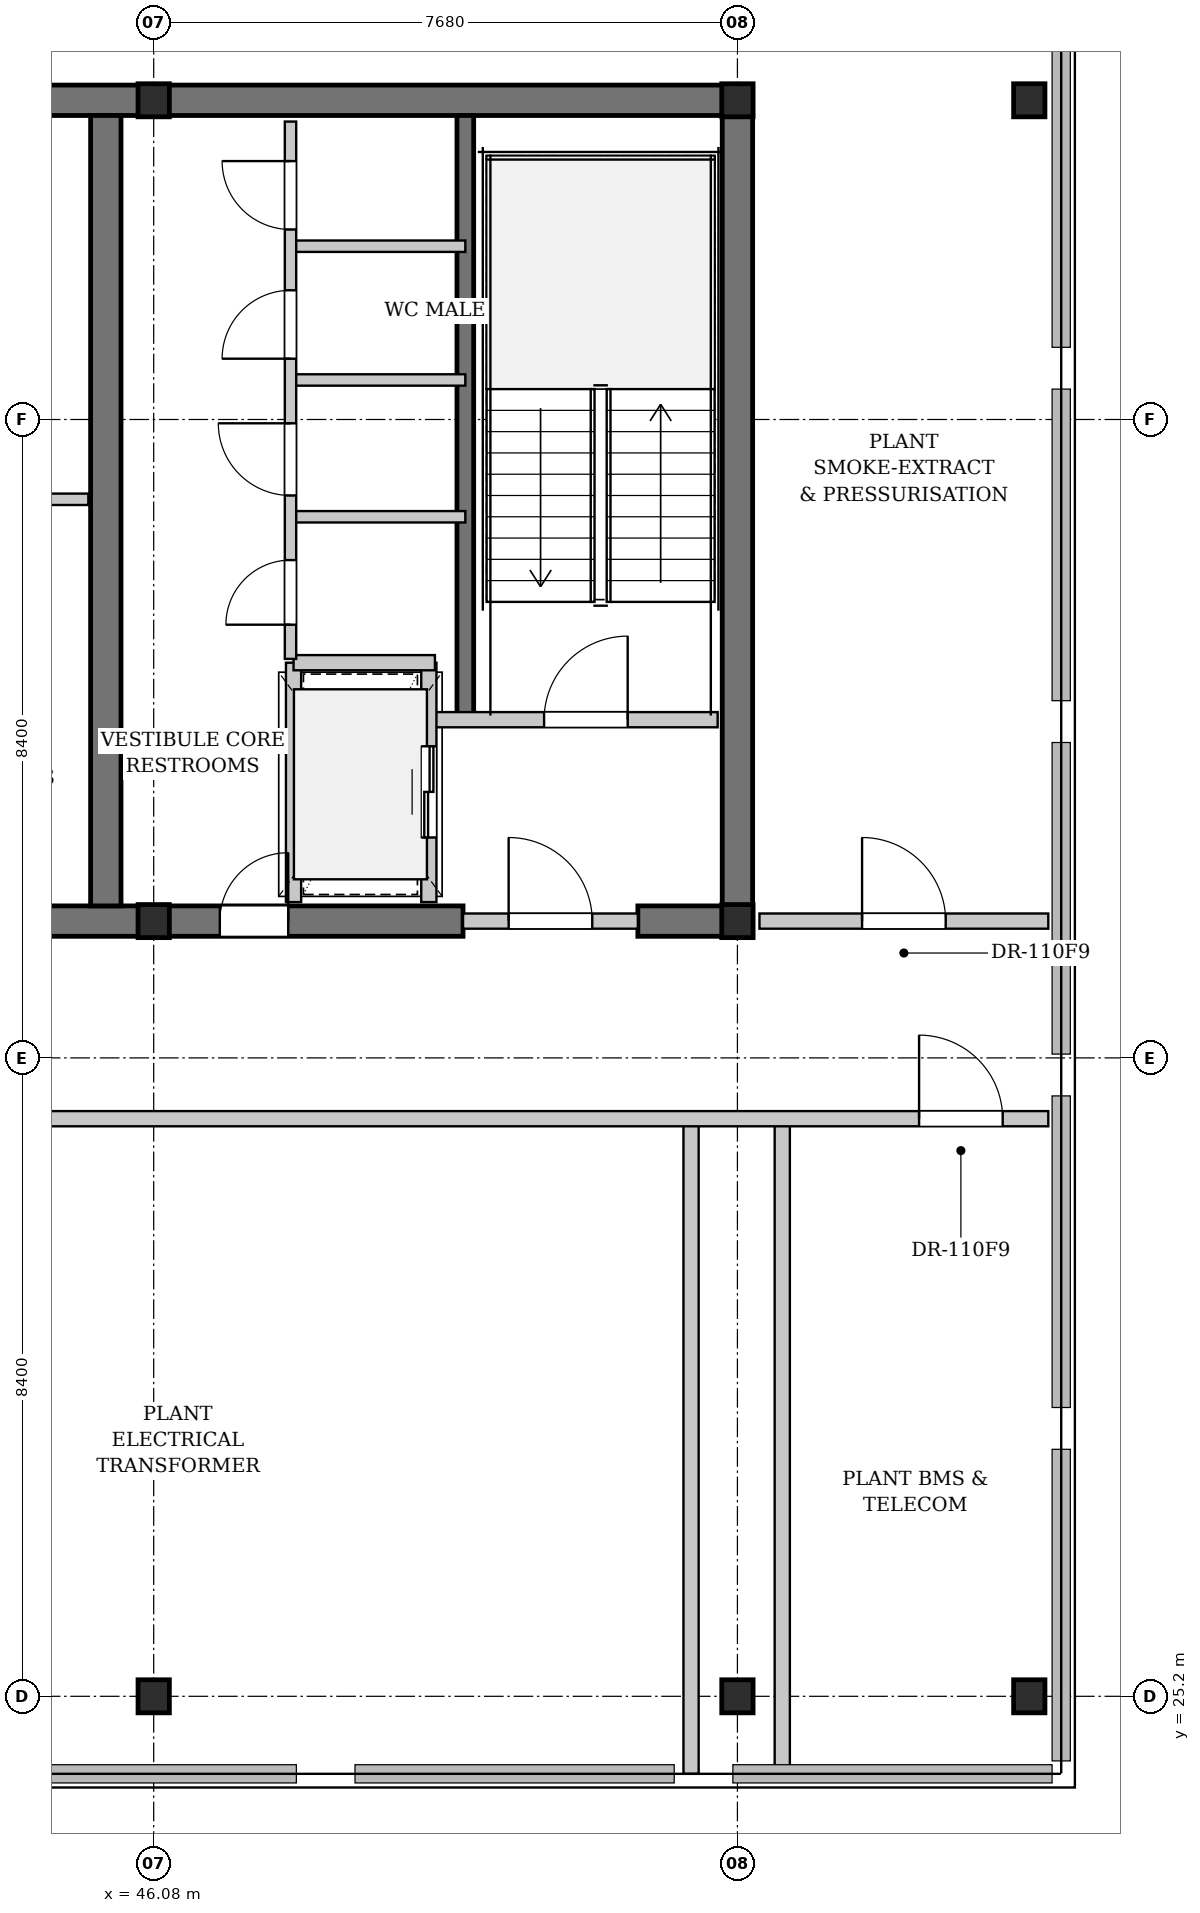
"""IFC4 building model, lengths in metres.
Left out: names, types, materials, properties, quantities, classifications, styles, units other than length and angle.
Written with IfcOpenShell. Run it as: python <this file> out.ifc"""

import sys

from ifc_helpers import new_model, si_unit, direction, frame, frame_2d, origin, origin_2d, place, context, subcontext, project, spatial, rectangle, i_section, extrude, element, fill, save


model = new_model("IFC4")
c1 = context("Model", 3, precision=1e-05, world=origin(), true_north=direction((0.0, 1.0)))
c2 = subcontext(c1, "Body", "Model", "MODEL_VIEW")
j1 = project(units=[si_unit("LENGTHUNIT", "METRE"), si_unit("PLANEANGLEUNIT", "RADIAN")], contexts=[c1])
p1 = place(None, origin())
s1 = spatial("IfcSite", under=j1, at=p1, CompositionType="ELEMENT")
p2 = place(p1, origin())
s2 = spatial("IfcBuilding", under=s1, at=p2, CompositionType="ELEMENT")
p3 = place(p2, frame((0.0, 0.0, 251.3)))
s3 = spatial("IfcBuildingStorey", under=s2, at=p3, CompositionType="ELEMENT", Elevation=251.3)
p4 = place(p3, frame((22.84, 46.2, 0.0), z_axis=(0.0, 0.0, 1.0), x_axis=(1.0, 0.0, 0.0)))
e1 = element("IfcWall", 1, at=p4, inside=s3, PredefinedType="SHEAR", context=c2, shape_type="SweptSolid", body=[
    extrude(rectangle(XDim=31.12, YDim=0.4, at=frame_2d((15.56, 0.0))), origin(), (0.0, 0.0, 1.0), 3.48),
])
p5 = place(p3, frame((42.1, 35.4, 0.0), z_axis=(0.0, 0.0, 1.0), x_axis=(1.0, 0.0, 0.0)))
e2 = element("IfcWall", 2, at=p5, inside=s3, PredefinedType="SHEAR", context=c2, shape_type="SweptSolid", body=[
    extrude(rectangle(XDim=8.05, YDim=0.4, at=frame_2d((4.025, 0.0))), origin(), (0.0, 0.0, 1.0), 3.48),
])
p6 = place(p5, frame((4.85, 0.0, 0.0)))
e3 = element("IfcOpeningElement", 3, at=p6, cuts=e2, PredefinedType="OPENING", context=c2, shape_type="SweptSolid", body=[
    extrude(rectangle(XDim=0.9, YDim=2.15, at=frame_2d((0.45, 1.075))), frame((0.0, 0.21, 0.0), z_axis=(0.0, -1.0, 0.0), x_axis=(1.0, 0.0, 0.0)), (0.0, 0.0, 1.0), 0.42),
])
p7 = place(p3, frame((52.45, 35.4, 0.0), z_axis=(0.0, 0.0, 1.0), x_axis=(1.0, 0.0, 0.0)))
e4 = element("IfcWall", 4, at=p7, inside=s3, PredefinedType="SHEAR", context=c2, shape_type="SweptSolid", body=[
    extrude(rectangle(XDim=1.51, YDim=0.4, at=frame_2d((0.755, 0.0))), origin(), (0.0, 0.0, 1.0), 3.48),
])
for number, where, z_axis, x_axis in (
    (5, (45.45, 35.6, 0.0), (0.0, 0.0, 1.0), (0.0, 1.0, 0.0)),
    (6, (53.76, 35.6, 0.0), (0.0, 0.0, 1.0), (0.0, 1.0, 0.0)),
):
    element("IfcWall", number, at=place(p3, frame(where, z_axis=z_axis, x_axis=x_axis)), inside=s3, PredefinedType="SHEAR", context=c2, shape_type="SweptSolid", body=[
        extrude(rectangle(XDim=10.4, YDim=0.4, at=frame_2d((5.2, 0.0))), origin(), (0.0, 0.0, 1.0), 3.48),
    ])
p8 = place(p3, frame((50.18, 38.05, 0.0), z_axis=(0.0, 0.0, 1.0), x_axis=(0.0, 1.0, 0.0)))
e7 = element("IfcWall", 7, at=p8, inside=s3, PredefinedType="SHEAR", context=c2, shape_type="SweptSolid", body=[
    extrude(rectangle(XDim=7.95, YDim=0.22, at=frame_2d((3.975, 0.0))), origin(), (0.0, 0.0, 1.0), 3.48),
])
for number, where, z_axis, x_axis in (
    (8, (46.08, 35.4, 0.0), (0.0, 0.0, 1.0), (1.0, 0.0, 0.0)),
    (9, (46.08, 46.2, 0.0), (0.0, 0.0, 1.0), (1.0, 0.0, 0.0)),
    (10, (46.08, 25.2, 0.0), (0.0, 0.0, 1.0), (1.0, 0.0, 0.0)),
    (11, (53.76, 35.4, 0.0), (0.0, 0.0, 1.0), (1.0, 0.0, 0.0)),
    (12, (53.76, 46.2, 0.0), (0.0, 0.0, 1.0), (1.0, 0.0, 0.0)),
    (13, (53.76, 25.2, 0.0), (0.0, 0.0, 1.0), (1.0, 0.0, 0.0)),
    (14, (57.6, 25.2, 0.0), (0.0, 0.0, 1.0), (1.0, 0.0, 0.0)),
    (15, (57.6, 46.2, 0.0), (0.0, 0.0, 1.0), (1.0, 0.0, 0.0)),
):
    element("IfcColumn", number, at=place(p3, frame(where, z_axis=z_axis, x_axis=x_axis)), inside=s3, PredefinedType="COLUMN", context=c2, shape_type="SweptSolid", body=[
        extrude(i_section(OverallWidth=0.412, OverallDepth=0.435, WebThickness=0.036, FlangeThickness=0.058, FilletRadius=0.015, at=origin_2d()), origin(), (0.0, 0.0, 1.0), 3.9),
    ])
p9 = place(p3, frame((41.85, 40.95, 0.0), z_axis=(0.0, 0.0, 1.0), x_axis=(1.0, 0.0, 0.0)))
e16 = element("IfcWall", 16, at=p9, inside=s3, PredefinedType="PARTITIONING", context=c2, shape_type="SweptSolid", body=[
    extrude(rectangle(XDim=3.37, YDim=0.15, at=frame_2d((1.685, 0.0))), origin(), (0.0, 0.0, 1.0), 3.48),
])
p10 = place(p3, frame((49.78, 38.05, 0.0), z_axis=(0.0, 0.0, 1.0), x_axis=(1.0, 0.0, 0.0)))
e17 = element("IfcWall", 17, at=p10, inside=s3, PredefinedType="PARTITIONING", context=c2, shape_type="SweptSolid", body=[
    extrude(rectangle(XDim=3.72, YDim=0.2, at=frame_2d((1.86, 0.0))), origin(), (0.0, 0.0, 1.0), 3.48),
])
p11 = place(p10, frame((1.436, 0.0, 0.0)))
e18 = element("IfcOpeningElement", 18, at=p11, cuts=e17, PredefinedType="OPENING", context=c2, shape_type="SweptSolid", body=[
    extrude(rectangle(XDim=1.1, YDim=2.15, at=frame_2d((0.55, 1.075))), frame((0.0, 0.11, 0.0), z_axis=(0.0, -1.0, 0.0), x_axis=(1.0, 0.0, 0.0)), (0.0, 0.0, 1.0), 0.22),
])
p12 = place(p3, frame((50.15, 35.4, 0.0), z_axis=(0.0, 0.0, 1.0), x_axis=(1.0, 0.0, 0.0)))
e19 = element("IfcWall", 19, at=p12, inside=s3, PredefinedType="PARTITIONING", context=c2, shape_type="SweptSolid", body=[
    extrude(rectangle(XDim=2.3, YDim=0.2, at=frame_2d((1.15, 0.0))), origin(), (0.0, 0.0, 1.0), 2.661),
])
p13 = place(p12, frame((0.6, 0.0, 0.0)))
e20 = element("IfcOpeningElement", 20, at=p13, cuts=e19, PredefinedType="OPENING", context=c2, shape_type="SweptSolid", body=[
    extrude(rectangle(XDim=1.1, YDim=2.15, at=frame_2d((0.55, 1.075))), frame((0.0, 0.11, 0.0), z_axis=(0.0, -1.0, 0.0), x_axis=(1.0, 0.0, 0.0)), (0.0, 0.0, 1.0), 0.22),
])
p14 = place(p3, frame((49.7, 35.65, 0.0), z_axis=(0.0, 0.0, 1.0), x_axis=(0.0, 1.0, 0.0)))
e21 = element("IfcWall", 21, at=p14, inside=s3, PredefinedType="PARTITIONING", context=c2, shape_type="SweptSolid", body=[
    extrude(rectangle(XDim=3.15, YDim=0.2, at=frame_2d((1.575, 0.0))), origin(), (0.0, 0.0, 1.0), 3.48),
])
p15 = place(p14, frame((0.85, 0.0, 0.0)))
e22 = element("IfcOpeningElement", 22, at=p15, cuts=e21, PredefinedType="OPENING", context=c2, shape_type="SweptSolid", body=[
    extrude(rectangle(XDim=1.2, YDim=2.2, at=frame_2d((0.6, 1.1))), frame((0.0, 0.11, 0.0), z_axis=(0.0, -1.0, 0.0), x_axis=(1.0, 0.0, 0.0)), (0.0, 0.0, 1.0), 0.22),
])
p16 = place(p3, frame((47.92, 35.65, 0.0), z_axis=(0.0, 0.0, 1.0), x_axis=(0.0, 1.0, 0.0)))
e23 = element("IfcWall", 23, at=p16, inside=s3, PredefinedType="PARTITIONING", context=c2, shape_type="SweptSolid", body=[
    extrude(rectangle(XDim=3.15, YDim=0.2, at=frame_2d((1.575, 0.0))), origin(), (0.0, 0.0, 1.0), 3.48),
])
p17 = place(p3, frame((47.92, 38.8, 0.0), z_axis=(0.0, 0.0, 1.0), x_axis=(1.0, 0.0, 0.0)))
e24 = element("IfcWall", 24, at=p17, inside=s3, PredefinedType="PARTITIONING", context=c2, shape_type="SweptSolid", body=[
    extrude(rectangle(XDim=1.86, YDim=0.2, at=frame_2d((0.93, 0.0))), origin(), (0.0, 0.0, 1.0), 3.48),
])
for number, where, z_axis, x_axis in (
    (25, (47.88, 40.72, 0.0), (0.0, 0.0, 1.0), (1.0, 0.0, 0.0)),
    (26, (47.88, 42.52, 0.0), (0.0, 0.0, 1.0), (1.0, 0.0, 0.0)),
    (27, (47.88, 44.28, 0.0), (0.0, 0.0, 1.0), (1.0, 0.0, 0.0)),
):
    element("IfcWall", number, at=place(p3, frame(where, z_axis=z_axis, x_axis=x_axis)), inside=s3, PredefinedType="PARTITIONING", context=c2, shape_type="SweptSolid", body=[
        extrude(rectangle(XDim=2.3, YDim=0.15, at=frame_2d((1.15, 0.0))), origin(), (0.0, 0.0, 1.0), 3.48),
    ])
p18 = place(p3, frame((47.88, 38.85, 0.0), z_axis=(0.0, 0.0, 1.0), x_axis=(0.0, 1.0, 0.0)))
e28 = element("IfcWall", 28, at=p18, inside=s3, PredefinedType="PARTITIONING", context=c2, shape_type="SweptSolid", body=[
    extrude(rectangle(XDim=7.07, YDim=0.15, at=frame_2d((3.535, 0.0))), origin(), (0.0, 0.0, 1.0), 3.48),
])
p19 = place(p18, frame((0.45, 0.0, 0.0)))
e29 = element("IfcOpeningElement", 29, at=p19, cuts=e28, PredefinedType="OPENING", context=c2, shape_type="SweptSolid", body=[
    extrude(rectangle(XDim=0.85, YDim=2.15, at=frame_2d((0.425, 1.075))), frame((0.0, 0.085, 0.0), z_axis=(0.0, -1.0, 0.0), x_axis=(1.0, 0.0, 0.0)), (0.0, 0.0, 1.0), 0.17),
])
p20 = place(p18, frame((2.15, 0.0, 0.0)))
e30 = element("IfcOpeningElement", 30, at=p20, cuts=e28, PredefinedType="OPENING", context=c2, shape_type="SweptSolid", body=[
    extrude(rectangle(XDim=0.95, YDim=2.15, at=frame_2d((0.475, 1.075))), frame((0.0, 0.085, 0.0), z_axis=(0.0, -1.0, 0.0), x_axis=(1.0, 0.0, 0.0)), (0.0, 0.0, 1.0), 0.17),
])
p21 = place(p18, frame((3.95, 0.0, 0.0)))
e31 = element("IfcOpeningElement", 31, at=p21, cuts=e28, PredefinedType="OPENING", context=c2, shape_type="SweptSolid", body=[
    extrude(rectangle(XDim=0.9, YDim=2.15, at=frame_2d((0.45, 1.075))), frame((0.0, 0.085, 0.0), z_axis=(0.0, -1.0, 0.0), x_axis=(1.0, 0.0, 0.0)), (0.0, 0.0, 1.0), 0.17),
])
p22 = place(p18, frame((5.65, 0.0, 0.0)))
e32 = element("IfcOpeningElement", 32, at=p22, cuts=e28, PredefinedType="OPENING", context=c2, shape_type="SweptSolid", body=[
    extrude(rectangle(XDim=0.9, YDim=2.15, at=frame_2d((0.45, 1.075))), frame((0.0, 0.085, 0.0), z_axis=(0.0, -1.0, 0.0), x_axis=(1.0, 0.0, 0.0)), (0.0, 0.0, 1.0), 0.17),
])
p23 = place(p3, frame((54.05, 35.4, 0.0), z_axis=(0.0, 0.0, 1.0), x_axis=(1.0, 0.0, 0.0)))
e33 = element("IfcWall", 33, at=p23, inside=s3, PredefinedType="PARTITIONING", context=c2, shape_type="SweptSolid", body=[
    extrude(rectangle(XDim=3.8, YDim=0.2, at=frame_2d((1.9, 0.0))), origin(), (0.0, 0.0, 1.0), 3.48),
])
p24 = place(p23, frame((1.35, 0.0, 0.0)))
e34 = element("IfcOpeningElement", 34, at=p24, cuts=e33, PredefinedType="OPENING", context=c2, shape_type="SweptSolid", body=[
    extrude(rectangle(XDim=1.1, YDim=2.15, at=frame_2d((0.55, 1.075))), frame((0.0, 0.11, 0.0), z_axis=(0.0, -1.0, 0.0), x_axis=(1.0, 0.0, 0.0)), (0.0, 0.0, 1.0), 0.22),
])
for number, where, z_axis, x_axis in (
    (35, (53.15, 24.18, 0.0), (0.0, 0.0, 1.0), (0.0, 1.0, 0.0)),
    (36, (54.35, 24.18, 0.0), (0.0, 0.0, 1.0), (0.0, 1.0, 0.0)),
):
    element("IfcWall", number, at=place(p3, frame(where, z_axis=z_axis, x_axis=x_axis)), inside=s3, PredefinedType="PARTITIONING", context=c2, shape_type="SweptSolid", body=[
        extrude(rectangle(XDim=8.62, YDim=0.2, at=frame_2d((4.31, 0.0))), origin(), (0.0, 0.0, 1.0), 3.48),
    ])
p25 = place(p3, frame((18.95, 32.8, 0.0), z_axis=(0.0, 0.0, 1.0), x_axis=(1.0, 0.0, 0.0)))
e37 = element("IfcWall", 37, at=p25, inside=s3, PredefinedType="PARTITIONING", context=c2, shape_type="SweptSolid", body=[
    extrude(rectangle(XDim=38.9, YDim=0.2, at=frame_2d((19.45, 0.0))), origin(), (0.0, 0.0, 1.0), 3.48),
])
p26 = place(p25, frame((0.6, 0.0, 0.0)))
e38 = element("IfcOpeningElement", 38, at=p26, cuts=e37, PredefinedType="OPENING", context=c2, shape_type="SweptSolid", body=[
    extrude(rectangle(XDim=1.1, YDim=2.15, at=frame_2d((0.55, 1.075))), frame((0.0, 0.11, 0.0), z_axis=(0.0, -1.0, 0.0), x_axis=(1.0, 0.0, 0.0)), (0.0, 0.0, 1.0), 0.22),
])
p27 = place(p25, frame((7.355, 0.0, 0.0)))
e39 = element("IfcOpeningElement", 39, at=p27, cuts=e37, PredefinedType="OPENING", context=c2, shape_type="SweptSolid", body=[
    extrude(rectangle(XDim=1.1, YDim=2.15, at=frame_2d((0.55, 1.075))), frame((0.0, 0.11, 0.0), z_axis=(0.0, -1.0, 0.0), x_axis=(1.0, 0.0, 0.0)), (0.0, 0.0, 1.0), 0.22),
])
p28 = place(p25, frame((22.761, 0.0, 0.0)))
e40 = element("IfcOpeningElement", 40, at=p28, cuts=e37, PredefinedType="OPENING", context=c2, shape_type="SweptSolid", body=[
    extrude(rectangle(XDim=1.1, YDim=2.15, at=frame_2d((0.55, 1.075))), frame((0.0, 0.11, 0.0), z_axis=(0.0, -1.0, 0.0), x_axis=(1.0, 0.0, 0.0)), (0.0, 0.0, 1.0), 0.22),
])
p29 = place(p25, frame((37.2, 0.0, 0.0)))
e41 = element("IfcOpeningElement", 41, at=p29, cuts=e37, PredefinedType="OPENING", context=c2, shape_type="SweptSolid", body=[
    extrude(rectangle(XDim=1.1, YDim=2.15, at=frame_2d((0.55, 1.075))), frame((0.0, 0.11, 0.0), z_axis=(0.0, -1.0, 0.0), x_axis=(1.0, 0.0, 0.0)), (0.0, 0.0, 1.0), 0.22),
])
p30 = place(p11, origin())
e42 = element("IfcDoor", 42, at=p30, inside=s3, OperationType="SINGLE_SWING_RIGHT", PredefinedType="DOOR", context=c2, shape_type="SweptSolid", body=[
    extrude(rectangle(XDim=1.1, YDim=2.15, at=frame_2d((0.55, 1.075))), frame((0.0, 0.025, 0.0), z_axis=(0.0, -1.0, 0.0), x_axis=(1.0, 0.0, 0.0)), (0.0, 0.0, 1.0), 0.05),
])
fill(e18, e42)
p31 = place(p13, origin())
e43 = element("IfcDoor", 43, at=p31, inside=s3, OperationType="SINGLE_SWING_LEFT", PredefinedType="DOOR", context=c2, shape_type="SweptSolid", body=[
    extrude(rectangle(XDim=1.1, YDim=2.15, at=frame_2d((0.55, 1.075))), frame((0.0, 0.025, 0.0), z_axis=(0.0, -1.0, 0.0), x_axis=(1.0, 0.0, 0.0)), (0.0, 0.0, 1.0), 0.05),
])
fill(e20, e43)
p32 = place(p15, origin())
e44 = element("IfcDoor", 44, at=p32, inside=s3, OperationType="DOUBLE_DOOR_SLIDING", PredefinedType="DOOR", context=c2, shape_type="SweptSolid", body=[
    extrude(rectangle(XDim=1.2, YDim=2.2, at=frame_2d((0.6, 1.1))), frame((0.0, 0.025, 0.0), z_axis=(0.0, -1.0, 0.0), x_axis=(1.0, 0.0, 0.0)), (0.0, 0.0, 1.0), 0.05),
])
fill(e22, e44)
p33 = place(p19, origin())
e45 = element("IfcDoor", 45, at=p33, inside=s3, OperationType="SINGLE_SWING_LEFT", PredefinedType="DOOR", context=c2, shape_type="SweptSolid", body=[
    extrude(rectangle(XDim=0.85, YDim=2.15, at=frame_2d((0.425, 1.075))), frame((0.0, 0.025, 0.0), z_axis=(0.0, -1.0, 0.0), x_axis=(1.0, 0.0, 0.0)), (0.0, 0.0, 1.0), 0.05),
])
fill(e29, e45)
p34 = place(p20, origin())
e46 = element("IfcDoor", 46, at=p34, inside=s3, OperationType="SINGLE_SWING_RIGHT", PredefinedType="DOOR", context=c2, shape_type="SweptSolid", body=[
    extrude(rectangle(XDim=0.95, YDim=2.15, at=frame_2d((0.475, 1.075))), frame((0.0, 0.025, 0.0), z_axis=(0.0, -1.0, 0.0), x_axis=(1.0, 0.0, 0.0)), (0.0, 0.0, 1.0), 0.05),
])
fill(e30, e46)
p35 = place(p21, origin())
e47 = element("IfcDoor", 47, at=p35, inside=s3, OperationType="SINGLE_SWING_LEFT", PredefinedType="DOOR", context=c2, shape_type="SweptSolid", body=[
    extrude(rectangle(XDim=0.9, YDim=2.15, at=frame_2d((0.45, 1.075))), frame((0.0, 0.025, 0.0), z_axis=(0.0, -1.0, 0.0), x_axis=(1.0, 0.0, 0.0)), (0.0, 0.0, 1.0), 0.05),
])
fill(e31, e47)
p36 = place(p22, origin())
e48 = element("IfcDoor", 48, at=p36, inside=s3, OperationType="SINGLE_SWING_RIGHT", PredefinedType="DOOR", context=c2, shape_type="SweptSolid", body=[
    extrude(rectangle(XDim=0.9, YDim=2.15, at=frame_2d((0.45, 1.075))), frame((0.0, 0.025, 0.0), z_axis=(0.0, -1.0, 0.0), x_axis=(1.0, 0.0, 0.0)), (0.0, 0.0, 1.0), 0.05),
])
fill(e32, e48)
p37 = place(p24, origin())
e49 = element("IfcDoor", 49, at=p37, inside=s3, OperationType="SINGLE_SWING_LEFT", PredefinedType="DOOR", context=c2, shape_type="SweptSolid", body=[
    extrude(rectangle(XDim=1.1, YDim=2.15, at=frame_2d((0.55, 1.075))), frame((0.0, 0.025, 0.0), z_axis=(0.0, -1.0, 0.0), x_axis=(1.0, 0.0, 0.0)), (0.0, 0.0, 1.0), 0.05),
])
fill(e34, e49)
p38 = place(p29, origin())
e50 = element("IfcDoor", 50, at=p38, inside=s3, OperationType="SINGLE_SWING_LEFT", PredefinedType="DOOR", context=c2, shape_type="SweptSolid", body=[
    extrude(rectangle(XDim=1.1, YDim=2.15, at=frame_2d((0.55, 1.075))), frame((0.0, 0.025, 0.0), z_axis=(0.0, -1.0, 0.0), x_axis=(1.0, 0.0, 0.0)), (0.0, 0.0, 1.0), 0.05),
])
fill(e41, e50)
p39 = place(p6, origin())
e51 = element("IfcDoor", 51, at=p39, inside=s3, OperationType="SINGLE_SWING_RIGHT", PredefinedType="DOOR", context=c2, shape_type="SweptSolid", body=[
    extrude(rectangle(XDim=0.9, YDim=2.15, at=frame_2d((0.45, 1.075))), frame((0.0, 0.025, 0.0), z_axis=(0.0, -1.0, 0.0), x_axis=(1.0, 0.0, 0.0)), (0.0, 0.0, 1.0), 0.05),
])
fill(e3, e51)
save(model, sys.argv[1])
